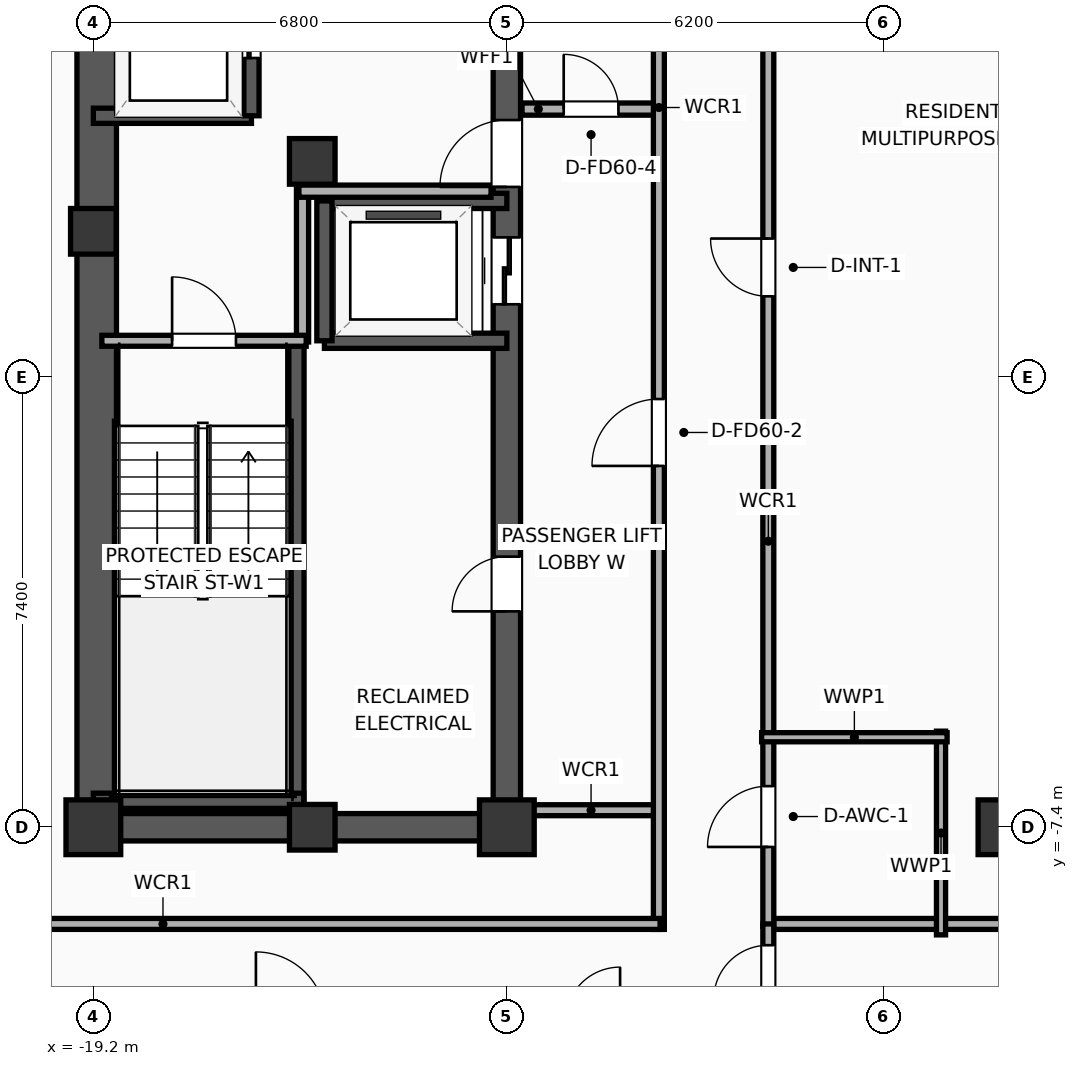
"""IFC4 building model, lengths in metres.
Left out: names, types, materials, properties, quantities, classifications, styles, units other than length and angle.
Written with IfcOpenShell. Run it as: python <this file> out.ifc"""

import sys

from ifc_helpers import new_model, si_unit, direction, frame, frame_2d, origin, origin_2d, place, context, subcontext, project, spatial, rectangle, extrude, element, fill, save


model = new_model("IFC4")
c1 = context("Model", 3, precision=1e-05, world=origin(), true_north=direction((0.0, 1.0)))
c2 = subcontext(c1, "Body", "Model", "MODEL_VIEW")
j1 = project(units=[si_unit("LENGTHUNIT", "METRE"), si_unit("PLANEANGLEUNIT", "RADIAN")], contexts=[c1])
p1 = place(None, origin())
s1 = spatial("IfcSite", under=j1, at=p1, CompositionType="ELEMENT")
p2 = place(p1, origin())
s2 = spatial("IfcBuilding", under=s1, at=p2, CompositionType="ELEMENT")
p3 = place(p2, frame((0.0, 0.0, 247.0)))
s3 = spatial("IfcBuildingStorey", under=s2, at=p3, CompositionType="ELEMENT", Elevation=247.0)
p4 = place(p3, frame((-19.2, -7.4, 0.0), z_axis=(0.0, 0.0, 1.0), x_axis=(1.0, 0.0, 0.0)))
e1 = element("IfcColumn", 1, at=p4, inside=s3, PredefinedType="COLUMN", context=c2, shape_type="SweptSolid", body=[
    extrude(rectangle(XDim=0.9, YDim=0.9, at=origin_2d()), origin(), (0.0, 0.0, 1.0), 3.9),
])
for number, where, z_axis, x_axis in (
    (2, (-19.2, 2.4, 0.0), (0.0, 0.0, 1.0), (1.0, 0.0, 0.0)),
    (3, (-15.6, -7.4, 0.0), (0.0, 0.0, 1.0), (1.0, 0.0, 0.0)),
):
    element("IfcColumn", number, at=place(p3, frame(where, z_axis=z_axis, x_axis=x_axis)), inside=s3, PredefinedType="COLUMN", context=c2, shape_type="SweptSolid", body=[
        extrude(rectangle(XDim=0.75, YDim=0.75, at=origin_2d()), origin(), (0.0, 0.0, 1.0), 3.9),
    ])
p5 = place(p3, frame((-12.4, -7.4, 0.0), z_axis=(0.0, 0.0, 1.0), x_axis=(1.0, 0.0, 0.0)))
e4 = element("IfcColumn", 4, at=p5, inside=s3, PredefinedType="COLUMN", context=c2, shape_type="SweptSolid", body=[
    extrude(rectangle(XDim=0.9, YDim=0.9, at=origin_2d()), origin(), (0.0, 0.0, 1.0), 3.9),
])
p6 = place(p3, frame((-15.6, 3.55, 0.0), z_axis=(0.0, 0.0, 1.0), x_axis=(1.0, 0.0, 0.0)))
e5 = element("IfcColumn", 5, at=p6, inside=s3, PredefinedType="COLUMN", context=c2, shape_type="SweptSolid", body=[
    extrude(rectangle(XDim=0.75, YDim=0.75, at=origin_2d()), origin(), (0.0, 0.0, 1.0), 3.9),
])
p7 = place(p3, frame((-19.425, -7.4, 0.0), z_axis=(0.0, 0.0, 1.0), x_axis=(1.0, 0.0, 0.0)))
e6 = element("IfcWall", 6, at=p7, inside=s3, PredefinedType="SHEAR", context=c2, shape_type="SweptSolid", body=[
    extrude(rectangle(XDim=7.25, YDim=0.45, at=frame_2d((3.625, 0.0))), origin(), (0.0, 0.0, 1.0), 3.65),
])
p8 = place(p3, frame((-19.145, -7.4, 0.0), z_axis=(0.0, 0.0, 1.0), x_axis=(0.0, 1.0, 0.0)))
e7 = element("IfcWall", 7, at=p8, inside=s3, PredefinedType="SHEAR", context=c2, shape_type="SweptSolid", body=[
    extrude(rectangle(XDim=14.8, YDim=0.65, at=frame_2d((7.4, 0.0))), origin(), (0.0, 0.0, 1.0), 3.65),
])
p9 = place(p3, frame((-12.4, -7.4, 0.0), z_axis=(0.0, 0.0, 1.0), x_axis=(0.0, 1.0, 0.0)))
e8 = element("IfcWall", 8, at=p9, inside=s3, PredefinedType="SHEAR", context=c2, shape_type="SweptSolid", body=[
    extrude(rectangle(XDim=14.8, YDim=0.45, at=frame_2d((7.4, 0.0))), origin(), (0.0, 0.0, 1.0), 3.65),
])
p10 = place(p9, frame((8.6, 0.0, 0.0)))
e9 = element("IfcOpeningElement", 9, at=p10, cuts=e8, PredefinedType="OPENING", context=c2, shape_type="SweptSolid", body=[
    extrude(rectangle(XDim=1.1, YDim=2.05, at=frame_2d((0.55, 1.025))), frame((0.0, 0.235, 0.0), z_axis=(0.0, -1.0, 0.0), x_axis=(1.0, 0.0, 0.0)), (0.0, 0.0, 1.0), 0.47),
])
p11 = place(p9, frame((10.53, 0.0, 0.0)))
e10 = element("IfcOpeningElement", 10, at=p11, cuts=e8, PredefinedType="OPENING", context=c2, shape_type="SweptSolid", body=[
    extrude(rectangle(XDim=1.1, YDim=2.05, at=frame_2d((0.55, 1.025))), frame((0.0, 0.235, 0.0), z_axis=(0.0, -1.0, 0.0), x_axis=(1.0, 0.0, 0.0)), (0.0, 0.0, 1.0), 0.47),
])
p12 = place(p9, frame((3.55, 0.0, 0.0)))
e11 = element("IfcOpeningElement", 11, at=p12, cuts=e8, PredefinedType="OPENING", context=c2, shape_type="SweptSolid", body=[
    extrude(rectangle(XDim=0.9, YDim=2.05, at=frame_2d((0.45, 1.025))), frame((0.0, 0.235, 0.0), z_axis=(0.0, -1.0, 0.0), x_axis=(1.0, 0.0, 0.0)), (0.0, 0.0, 1.0), 0.47),
])
p13 = place(p3, frame((-15.86, -7.085, 0.0), z_axis=(0.0, 0.0, 1.0), x_axis=(0.0, 1.0, 0.0)))
e12 = element("IfcWall", 12, at=p13, inside=s3, PredefinedType="SOLIDWALL", context=c2, shape_type="SweptSolid", body=[
    extrude(rectangle(XDim=7.685, YDim=0.25, at=frame_2d((3.843, 0.0))), origin(), (0.0, 0.0, 1.0), 3.65),
])
p14 = place(p3, frame((-19.2, -6.965, 0.0), z_axis=(0.0, 0.0, 1.0), x_axis=(1.0, 0.0, 0.0)))
e13 = element("IfcWall", 13, at=p14, inside=s3, PredefinedType="SOLIDWALL", context=c2, shape_type="SweptSolid", body=[
    extrude(rectangle(XDim=3.46, YDim=0.25, at=frame_2d((1.73, 0.0))), origin(), (0.0, 0.0, 1.0), 3.65),
])
p15 = place(p3, frame((-4.2, -7.4, 0.0), z_axis=(0.0, 0.0, 1.0), x_axis=(1.0, 0.0, 0.0)))
e14 = element("IfcColumn", 14, at=p15, inside=s3, PredefinedType="COLUMN", context=c2, shape_type="SweptSolid", body=[
    extrude(rectangle(XDim=0.9, YDim=0.9, at=origin_2d()), origin(), (0.0, 0.0, 1.0), 3.9),
])
p16 = place(p3, frame((-19.2, 4.3, 0.0), z_axis=(0.0, 0.0, 1.0), x_axis=(1.0, 0.0, 0.0)))
e15 = element("IfcWall", 15, at=p16, inside=s3, PredefinedType="SOLIDWALL", context=c2, shape_type="SweptSolid", body=[
    extrude(rectangle(XDim=2.6, YDim=0.25, at=frame_2d((1.3, 0.0))), origin(), (0.0, 0.0, 1.0), 3.65),
])
p17 = place(p3, frame((-16.6, 4.3, 0.0), z_axis=(0.0, 0.0, 1.0), x_axis=(0.0, 1.0, 0.0)))
e16 = element("IfcWall", 16, at=p17, inside=s3, PredefinedType="SOLIDWALL", context=c2, shape_type="SweptSolid", body=[
    extrude(rectangle(XDim=3.1, YDim=0.25, at=frame_2d((1.55, 0.0))), origin(), (0.0, 0.0, 1.0), 3.65),
])
p18 = place(p17, frame((0.95, 0.0, 0.0)))
e17 = element("IfcOpeningElement", 17, at=p18, cuts=e16, PredefinedType="OPENING", context=c2, shape_type="SweptSolid", body=[
    extrude(rectangle(XDim=1.2, YDim=2.05, at=frame_2d((0.6, 1.025))), frame((0.0, 0.135, 0.0), z_axis=(0.0, -1.0, 0.0), x_axis=(1.0, 0.0, 0.0)), (0.0, 0.0, 1.0), 0.27),
])
for number, where, z_axis, x_axis in (
    (18, (-15.4, 0.6, 0.0), (0.0, 0.0, 1.0), (1.0, 0.0, 0.0)),
    (19, (-12.4, 2.9, 0.0), (0.0, 0.0, 1.0), (-1.0, 0.0, 0.0)),
):
    element("IfcWall", number, at=place(p3, frame(where, z_axis=z_axis, x_axis=x_axis)), inside=s3, PredefinedType="SOLIDWALL", context=c2, shape_type="SweptSolid", body=[
        extrude(rectangle(XDim=3.0, YDim=0.25, at=frame_2d((1.5, 0.0))), origin(), (0.0, 0.0, 1.0), 3.65),
    ])
p19 = place(p3, frame((-15.4, 2.9, 0.0), z_axis=(0.0, 0.0, 1.0), x_axis=(0.0, -1.0, 0.0)))
e20 = element("IfcWall", 20, at=p19, inside=s3, PredefinedType="SOLIDWALL", context=c2, shape_type="SweptSolid", body=[
    extrude(rectangle(XDim=2.3, YDim=0.25, at=frame_2d((1.15, 0.0))), origin(), (0.0, 0.0, 1.0), 3.65),
])
p20 = place(p3, frame((-15.76, 0.58, 0.0), z_axis=(0.0, 0.0, 1.0), x_axis=(0.0, 1.0, 0.0)))
e21 = element("IfcWall", 21, at=p20, inside=s3, PredefinedType="PARTITIONING", context=c2, shape_type="SweptSolid", body=[
    extrude(rectangle(XDim=2.52, YDim=0.2, at=frame_2d((1.26, 0.0))), origin(), (0.0, 0.0, 1.0), 3.65),
])
p21 = place(p3, frame((-15.82, 3.06, 0.0), z_axis=(0.0, 0.0, 1.0), x_axis=(1.0, 0.0, 0.0)))
e22 = element("IfcWall", 22, at=p21, inside=s3, PredefinedType="PARTITIONING", context=c2, shape_type="SweptSolid", body=[
    extrude(rectangle(XDim=3.16, YDim=0.2, at=frame_2d((1.58, 0.0))), origin(), (0.0, 0.0, 1.0), 3.65),
])
p22 = place(p3, frame((-19.06, 0.6, 0.0), z_axis=(0.0, 0.0, 1.0), x_axis=(1.0, 0.0, 0.0)))
e23 = element("IfcWall", 23, at=p22, inside=s3, PredefinedType="PARTITIONING", context=c2, shape_type="SweptSolid", body=[
    extrude(rectangle(XDim=3.36, YDim=0.18, at=frame_2d((1.68, 0.0))), origin(), (0.0, 0.0, 1.0), 3.65),
])
p23 = place(p22, frame((1.155, 0.0, 0.0)))
e24 = element("IfcOpeningElement", 24, at=p23, cuts=e23, PredefinedType="OPENING", context=c2, shape_type="SweptSolid", body=[
    extrude(rectangle(XDim=1.05, YDim=2.05, at=frame_2d((0.525, 1.025))), frame((0.0, 0.1, 0.0), z_axis=(0.0, -1.0, 0.0), x_axis=(1.0, 0.0, 0.0)), (0.0, 0.0, 1.0), 0.2),
])
p24 = place(p3, frame((-12.15, 4.41, 0.0), z_axis=(0.0, 0.0, 1.0), x_axis=(1.0, 0.0, 0.0)))
e25 = element("IfcWall", 25, at=p24, inside=s3, PredefinedType="PARTITIONING", context=c2, shape_type="SweptSolid", body=[
    extrude(rectangle(XDim=2.27, YDim=0.2, at=frame_2d((1.135, 0.0))), origin(), (0.0, 0.0, 1.0), 3.65),
])
p25 = place(p24, frame((0.685, 0.0, 0.0)))
e26 = element("IfcOpeningElement", 26, at=p25, cuts=e25, PredefinedType="OPENING", context=c2, shape_type="SweptSolid", body=[
    extrude(rectangle(XDim=0.9, YDim=2.05, at=frame_2d((0.45, 1.025))), frame((0.0, 0.11, 0.0), z_axis=(0.0, -1.0, 0.0), x_axis=(1.0, 0.0, 0.0)), (0.0, 0.0, 1.0), 0.22),
])
p26 = place(p3, frame((-12.15, -7.12, 0.0), z_axis=(0.0, 0.0, 1.0), x_axis=(1.0, 0.0, 0.0)))
e27 = element("IfcWall", 27, at=p26, inside=s3, PredefinedType="PARTITIONING", context=c2, shape_type="SweptSolid", body=[
    extrude(rectangle(XDim=2.27, YDim=0.18, at=frame_2d((1.135, 0.0))), origin(), (0.0, 0.0, 1.0), 3.65),
])
p27 = place(p3, frame((-9.9, -9.08, 0.0), z_axis=(0.0, 0.0, 1.0), x_axis=(0.0, 1.0, 0.0)))
e28 = element("IfcWall", 28, at=p27, inside=s3, PredefinedType="PARTITIONING", context=c2, shape_type="SweptSolid", body=[
    extrude(rectangle(XDim=18.16, YDim=0.18, at=frame_2d((9.08, 0.0))), origin(), (0.0, 0.0, 1.0), 3.65),
])
p28 = place(p27, frame((7.622, 0.0, 0.0)))
e29 = element("IfcOpeningElement", 29, at=p28, cuts=e28, PredefinedType="OPENING", context=c2, shape_type="SweptSolid", body=[
    extrude(rectangle(XDim=1.1, YDim=2.05, at=frame_2d((0.55, 1.025))), frame((0.0, 0.1, 0.0), z_axis=(0.0, -1.0, 0.0), x_axis=(1.0, 0.0, 0.0)), (0.0, 0.0, 1.0), 0.2),
])
p29 = place(p3, frame((-26.23, -8.99, 0.0), z_axis=(0.0, 0.0, 1.0), x_axis=(1.0, 0.0, 0.0)))
e30 = element("IfcWall", 30, at=p29, inside=s3, PredefinedType="PARTITIONING", context=c2, shape_type="SweptSolid", body=[
    extrude(rectangle(XDim=16.35, YDim=0.18, at=frame_2d((8.175, 0.0))), origin(), (0.0, 0.0, 1.0), 3.65),
])
p30 = place(p3, frame((-8.15, -8.99, 0.0), z_axis=(0.0, 0.0, 1.0), x_axis=(1.0, 0.0, 0.0)))
e31 = element("IfcWall", 31, at=p30, inside=s3, PredefinedType="PARTITIONING", context=c2, shape_type="SweptSolid", body=[
    extrude(rectangle(XDim=16.3, YDim=0.18, at=frame_2d((8.15, 0.0))), origin(), (0.0, 0.0, 1.0), 3.65),
])
p31 = place(p3, frame((-8.1, -9.03, 0.0), z_axis=(0.0, 0.0, 1.0), x_axis=(0.0, 1.0, 0.0)))
e32 = element("IfcWall", 32, at=p31, inside=s3, PredefinedType="PARTITIONING", context=c2, shape_type="SweptSolid", body=[
    extrude(rectangle(XDim=18.06, YDim=0.18, at=frame_2d((9.03, 0.0))), origin(), (0.0, 0.0, 1.0), 3.65),
])
p32 = place(p31, frame((1.306, 0.0, 0.0)))
e33 = element("IfcOpeningElement", 33, at=p32, cuts=e32, PredefinedType="OPENING", context=c2, shape_type="SweptSolid", body=[
    extrude(rectangle(XDim=1.0, YDim=2.05, at=frame_2d((0.5, 1.025))), frame((0.0, 0.1, 0.0), z_axis=(0.0, -1.0, 0.0), x_axis=(1.0, 0.0, 0.0)), (0.0, 0.0, 1.0), 0.2),
])
p33 = place(p31, frame((10.361, 0.0, 0.0)))
e34 = element("IfcOpeningElement", 34, at=p33, cuts=e32, PredefinedType="OPENING", context=c2, shape_type="SweptSolid", body=[
    extrude(rectangle(XDim=0.95, YDim=2.05, at=frame_2d((0.475, 1.025))), frame((0.0, 0.1, 0.0), z_axis=(0.0, -1.0, 0.0), x_axis=(1.0, 0.0, 0.0)), (0.0, 0.0, 1.0), 0.2),
])
p34 = place(p3, frame((-5.26, -9.17, 0.0), z_axis=(0.0, 0.0, 1.0), x_axis=(0.0, 1.0, 0.0)))
e35 = element("IfcWall", 35, at=p34, inside=s3, PredefinedType="PLUMBINGWALL", context=c2, shape_type="SweptSolid", body=[
    extrude(rectangle(XDim=3.35, YDim=0.15, at=frame_2d((1.675, 0.0))), origin(), (0.0, 0.0, 1.0), 3.65),
])
p35 = place(p3, frame((-8.21, -5.92, 0.0), z_axis=(0.0, 0.0, 1.0), x_axis=(1.0, 0.0, 0.0)))
e36 = element("IfcWall", 36, at=p35, inside=s3, PredefinedType="PLUMBINGWALL", context=c2, shape_type="SweptSolid", body=[
    extrude(rectangle(XDim=3.05, YDim=0.15, at=frame_2d((1.525, 0.0))), origin(), (0.0, 0.0, 1.0), 3.65),
])
p36 = place(p3, frame((-8.1, -18.83, 0.0), z_axis=(0.0, 0.0, 1.0), x_axis=(0.0, 1.0, 0.0)))
e37 = element("IfcWall", 37, at=p36, inside=s3, PredefinedType="PARTITIONING", context=c2, shape_type="SweptSolid", body=[
    extrude(rectangle(XDim=9.84, YDim=0.18, at=frame_2d((4.92, 0.0))), origin(), (0.0, 0.0, 1.0), 3.65),
])
p37 = place(p36, frame((8.59, 0.0, 0.0)))
e38 = element("IfcOpeningElement", 38, at=p37, cuts=e37, PredefinedType="OPENING", context=c2, shape_type="SweptSolid", body=[
    extrude(rectangle(XDim=0.9, YDim=2.05, at=frame_2d((0.45, 1.025))), frame((0.0, 0.1, 0.0), z_axis=(0.0, -1.0, 0.0), x_axis=(1.0, 0.0, 0.0)), (0.0, 0.0, 1.0), 0.2),
])
p38 = place(p18, origin())
e39 = element("IfcDoor", 39, at=p38, inside=s3, OperationType="SLIDING_TO_LEFT", PredefinedType="DOOR", context=c2, shape_type="SweptSolid", body=[
    extrude(rectangle(XDim=1.2, YDim=2.05, at=frame_2d((0.6, 1.025))), frame((0.0, 0.025, 0.0), z_axis=(0.0, -1.0, 0.0), x_axis=(1.0, 0.0, 0.0)), (0.0, 0.0, 1.0), 0.05),
])
fill(e17, e39)
p39 = place(p10, origin())
e40 = element("IfcDoor", 40, at=p39, inside=s3, OperationType="SLIDING_TO_LEFT", PredefinedType="DOOR", context=c2, shape_type="SweptSolid", body=[
    extrude(rectangle(XDim=1.1, YDim=2.05, at=frame_2d((0.55, 1.025))), frame((0.0, 0.025, 0.0), z_axis=(0.0, -1.0, 0.0), x_axis=(1.0, 0.0, 0.0)), (0.0, 0.0, 1.0), 0.05),
])
fill(e9, e40)
p40 = place(p23, origin())
e41 = element("IfcDoor", 41, at=p40, inside=s3, OperationType="SINGLE_SWING_LEFT", PredefinedType="DOOR", context=c2, shape_type="SweptSolid", body=[
    extrude(rectangle(XDim=1.05, YDim=2.05, at=frame_2d((0.525, 1.025))), frame((0.0, 0.025, 0.0), z_axis=(0.0, -1.0, 0.0), x_axis=(1.0, 0.0, 0.0)), (0.0, 0.0, 1.0), 0.05),
])
fill(e24, e41)
p41 = place(p25, origin())
e42 = element("IfcDoor", 42, at=p41, inside=s3, OperationType="SINGLE_SWING_LEFT", PredefinedType="DOOR", context=c2, shape_type="SweptSolid", body=[
    extrude(rectangle(XDim=0.9, YDim=2.05, at=frame_2d((0.45, 1.025))), frame((0.0, 0.025, 0.0), z_axis=(0.0, -1.0, 0.0), x_axis=(1.0, 0.0, 0.0)), (0.0, 0.0, 1.0), 0.05),
])
fill(e26, e42)
p42 = place(p28, origin())
e43 = element("IfcDoor", 43, at=p42, inside=s3, OperationType="SINGLE_SWING_LEFT", PredefinedType="DOOR", context=c2, shape_type="SweptSolid", body=[
    extrude(rectangle(XDim=1.1, YDim=2.05, at=frame_2d((0.55, 1.025))), frame((0.0, 0.025, 0.0), z_axis=(0.0, -1.0, 0.0), x_axis=(1.0, 0.0, 0.0)), (0.0, 0.0, 1.0), 0.05),
])
fill(e29, e43)
p43 = place(p32, origin())
e44 = element("IfcDoor", 44, at=p43, inside=s3, OperationType="SINGLE_SWING_LEFT", PredefinedType="DOOR", context=c2, shape_type="SweptSolid", body=[
    extrude(rectangle(XDim=1.0, YDim=2.05, at=frame_2d((0.5, 1.025))), frame((0.0, 0.025, 0.0), z_axis=(0.0, -1.0, 0.0), x_axis=(1.0, 0.0, 0.0)), (0.0, 0.0, 1.0), 0.05),
])
fill(e33, e44)
p44 = place(p33, origin())
e45 = element("IfcDoor", 45, at=p44, inside=s3, OperationType="SINGLE_SWING_RIGHT", PredefinedType="DOOR", context=c2, shape_type="SweptSolid", body=[
    extrude(rectangle(XDim=0.95, YDim=2.05, at=frame_2d((0.475, 1.025))), frame((0.0, 0.025, 0.0), z_axis=(0.0, -1.0, 0.0), x_axis=(1.0, 0.0, 0.0)), (0.0, 0.0, 1.0), 0.05),
])
fill(e34, e45)
p45 = place(p37, origin())
e46 = element("IfcDoor", 46, at=p45, inside=s3, OperationType="SINGLE_SWING_LEFT", PredefinedType="DOOR", context=c2, shape_type="SweptSolid", body=[
    extrude(rectangle(XDim=0.9, YDim=2.05, at=frame_2d((0.45, 1.025))), frame((0.0, 0.025, 0.0), z_axis=(0.0, -1.0, 0.0), x_axis=(1.0, 0.0, 0.0)), (0.0, 0.0, 1.0), 0.05),
])
fill(e38, e46)
p46 = place(p11, origin())
e47 = element("IfcDoor", 47, at=p46, inside=s3, OperationType="SINGLE_SWING_LEFT", PredefinedType="DOOR", context=c2, shape_type="SweptSolid", body=[
    extrude(rectangle(XDim=1.1, YDim=2.05, at=frame_2d((0.55, 1.025))), frame((0.0, 0.025, 0.0), z_axis=(0.0, -1.0, 0.0), x_axis=(1.0, 0.0, 0.0)), (0.0, 0.0, 1.0), 0.05),
])
fill(e10, e47)
p47 = place(p12, origin())
e48 = element("IfcDoor", 48, at=p47, inside=s3, OperationType="SINGLE_SWING_LEFT", PredefinedType="DOOR", context=c2, shape_type="SweptSolid", body=[
    extrude(rectangle(XDim=0.9, YDim=2.05, at=frame_2d((0.45, 1.025))), frame((0.0, 0.025, 0.0), z_axis=(0.0, -1.0, 0.0), x_axis=(1.0, 0.0, 0.0)), (0.0, 0.0, 1.0), 0.05),
])
fill(e11, e48)
save(model, sys.argv[1])
